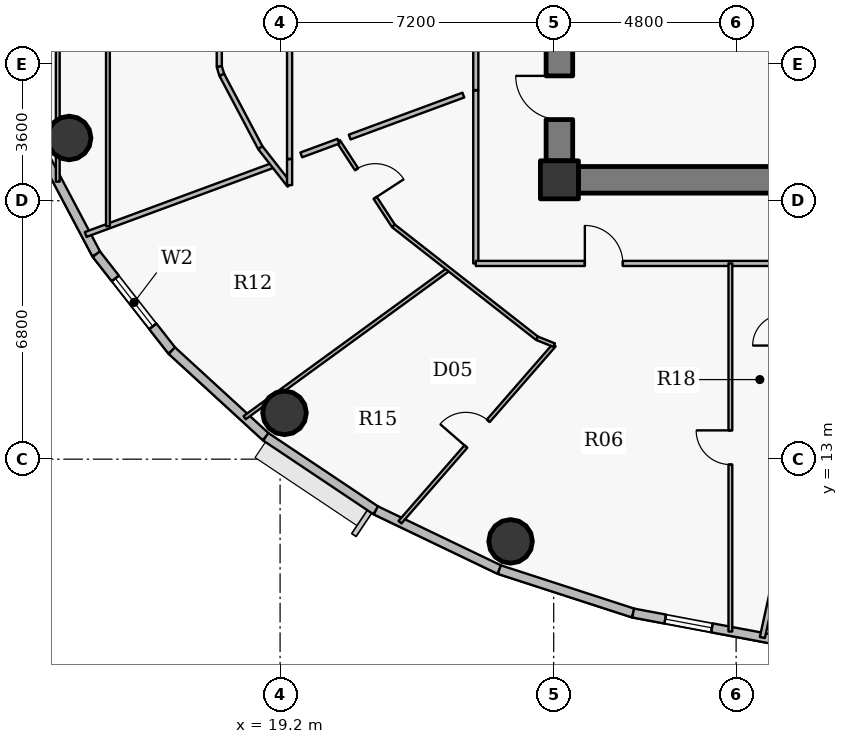
"""IFC4 building model, lengths in metres.
Left out: names, types, materials, properties, quantities, classifications, styles, units other than length and angle.
Written with IfcOpenShell. Run it as: python <this file> out.ifc"""

import sys

from ifc_helpers import new_model, si_unit, direction, frame, frame_2d, origin, origin_2d, place, context, subcontext, project, spatial, rectangle, hollow_circle, extrude, source, transform, mapped, element, fill, save


model = new_model("IFC4")
c1 = context("Model", 3, precision=1e-05, world=origin(), true_north=direction((0.0, 1.0)))
c2 = subcontext(c1, "Body", "Model", "MODEL_VIEW")
j1 = project(units=[si_unit("LENGTHUNIT", "METRE"), si_unit("PLANEANGLEUNIT", "RADIAN")], contexts=[c1])
p1 = place(None, origin())
s1 = spatial("IfcSite", under=j1, at=p1, CompositionType="ELEMENT")
p2 = place(p1, origin())
s2 = spatial("IfcBuilding", under=s1, at=p2, CompositionType="ELEMENT")
p3 = place(p2, frame((0.0, 0.0, 221.55)))
s3 = spatial("IfcBuildingStorey", under=s2, at=p3, CompositionType="ELEMENT", Elevation=221.55)
p4 = place(p3, frame((26.55, 20.35, 0.0), z_axis=(0.0, 0.0, 1.0), x_axis=(1.0, 0.0, 0.0)))
e1 = element("IfcColumn", 1, at=p4, inside=s3, PredefinedType="COLUMN", context=c2, shape_type="SweptSolid", body=[
    extrude(rectangle(XDim=1.0, YDim=1.0, at=origin_2d()), origin(), (0.0, 0.0, 1.0), 3.75),
])
p5 = place(p3, frame((44.95, 20.35, 0.0), z_axis=(0.0, 0.0, 1.0), x_axis=(-1.0, 0.0, 0.0)))
e2 = element("IfcWall", 2, at=p5, inside=s3, PredefinedType="SHEAR", context=c2, shape_type="SweptSolid", body=[
    extrude(rectangle(XDim=17.9, YDim=0.7, at=frame_2d((8.95, 0.0))), origin(), (0.0, 0.0, 1.0), 3.05),
])
p6 = place(p5, frame((9.7, 0.0, 0.0)))
e3 = element("IfcOpeningElement", 3, at=p6, cuts=e2, PredefinedType="OPENING", context=c2, shape_type="SweptSolid", body=[
    extrude(rectangle(XDim=1.15, YDim=2.15, at=origin_2d()), frame((0.575, 0.36, 1.075), z_axis=(0.0, -1.0, 0.0), x_axis=(1.0, 0.0, 0.0)), (0.0, 0.0, 1.0), 0.72),
])
p7 = place(p3, frame((26.55, 20.85, 0.0), z_axis=(0.0, 0.0, 1.0), x_axis=(0.0, 1.0, 0.0)))
e4 = element("IfcWall", 4, at=p7, inside=s3, PredefinedType="SHEAR", context=c2, shape_type="SweptSolid", body=[
    extrude(rectangle(XDim=12.3, YDim=0.7, at=frame_2d((6.15, 0.0))), origin(), (0.0, 0.0, 1.0), 3.05),
])
p8 = place(p7, frame((1.085, 0.0, 0.0)))
e5 = element("IfcOpeningElement", 5, at=p8, cuts=e4, PredefinedType="OPENING", context=c2, shape_type="SweptSolid", body=[
    extrude(rectangle(XDim=1.15, YDim=2.15, at=origin_2d()), frame((0.575, 0.36, 1.075), z_axis=(0.0, -1.0, 0.0), x_axis=(1.0, 0.0, 0.0)), (0.0, 0.0, 1.0), 0.72),
])
for number, where, z_axis, x_axis in (
    (6, (13.649, 21.451, 0.0), (0.0, 0.0, 1.0), (1.0, 0.0, 0.0)),
    (7, (19.317, 14.219, 0.0), (0.0, 0.0, 1.0), (1.0, 0.0, 0.0)),
    (8, (25.265, 10.836, 0.0), (0.0, 0.0, 1.0), (1.0, 0.0, 0.0)),
):
    element("IfcColumn", number, at=place(p3, frame(where, z_axis=z_axis, x_axis=x_axis)), inside=s3, PredefinedType="COLUMN", context=c2, shape_type="SweptSolid", body=[
        extrude(hollow_circle(Radius=0.575, WallThickness=0.036, at=origin_2d()), origin(), (0.0, 0.0, 1.0), 3.75),
    ])
p9 = place(p3, frame((14.364, 18.395, 0.0), z_axis=(0.0, 0.0, 1.0), x_axis=(-0.46766049993, 0.883908172157, 0.0)))
e9 = element("IfcWall", 9, at=p9, inside=s3, PredefinedType="SOLIDWALL", context=c2, shape_type="SweptSolid", body=[
    extrude(rectangle(XDim=3.11, YDim=0.24, at=frame_2d((1.555, 0.0))), origin(), (0.0, 0.0, 1.0), 3.5),
])
p10 = place(p3, frame((16.352, 15.855, 0.0), z_axis=(0.0, 0.0, 1.0), x_axis=(-0.616312344705, 0.787501805562, 0.0)))
e10 = element("IfcWall", 10, at=p10, inside=s3, PredefinedType="SOLIDWALL", context=c2, shape_type="SweptSolid", body=[
    extrude(rectangle(XDim=3.225, YDim=0.24, at=frame_2d((1.612, 0.0))), origin(), (0.0, 0.0, 1.0), 3.5),
])
p11 = place(p10, frame((0.812, 0.0, 0.9)))
e11 = element("IfcOpeningElement", 11, at=p11, cuts=e10, PredefinedType="OPENING", context=c2, shape_type="SweptSolid", body=[
    extrude(rectangle(XDim=1.6, YDim=1.75, at=origin_2d()), frame((0.8, 0.13, 0.875), z_axis=(0.0, -1.0, 0.0), x_axis=(1.0, 0.0, 0.0)), (0.0, 0.0, 1.0), 0.26),
])
p12 = place(p3, frame((18.824, 13.589, 0.0), z_axis=(0.0, 0.0, 1.0), x_axis=(-0.737123922599, 0.675757591694, 0.0)))
e12 = element("IfcWall", 12, at=p12, inside=s3, PredefinedType="SOLIDWALL", context=c2, shape_type="SweptSolid", body=[
    extrude(rectangle(XDim=3.354, YDim=0.24, at=frame_2d((1.677, 0.0))), origin(), (0.0, 0.0, 1.0), 3.5),
])
p13 = place(p3, frame((21.72, 11.652, 0.0), z_axis=(0.0, 0.0, 1.0), x_axis=(-0.831262496074, 0.555880079352, 0.0)))
e13 = element("IfcWall", 13, at=p13, inside=s3, PredefinedType="SOLIDWALL", context=c2, shape_type="SweptSolid", body=[
    extrude(rectangle(XDim=3.484, YDim=0.24, at=frame_2d((1.742, 0.0))), origin(), (0.0, 0.0, 1.0), 3.5),
])
p14 = place(p3, frame((24.969, 10.094, 0.0), z_axis=(0.0, 0.0, 1.0), x_axis=(-0.901598104751, 0.432574684313, 0.0)))
e14 = element("IfcWall", 14, at=p14, inside=s3, PredefinedType="SOLIDWALL", context=c2, shape_type="SweptSolid", body=[
    extrude(rectangle(XDim=3.604, YDim=0.24, at=frame_2d((1.802, 0.0))), origin(), (0.0, 0.0, 1.0), 3.5),
])
p15 = place(p3, frame((28.491, 8.951, 0.0), z_axis=(0.0, 0.0, 1.0), x_axis=(-0.951210789182, 0.308541787354, 0.0)))
e15 = element("IfcWall", 15, at=p15, inside=s3, PredefinedType="SOLIDWALL", context=c2, shape_type="SweptSolid", body=[
    extrude(rectangle(XDim=3.702, YDim=0.24, at=frame_2d((1.851, 0.0))), origin(), (0.0, 0.0, 1.0), 3.5),
])
p16 = place(p3, frame((32.198, 8.254, 0.0), z_axis=(0.0, 0.0, 1.0), x_axis=(-0.982784898575, 0.184753465822, 0.0)))
e16 = element("IfcWall", 16, at=p16, inside=s3, PredefinedType="SOLIDWALL", context=c2, shape_type="SweptSolid", body=[
    extrude(rectangle(XDim=3.773, YDim=0.24, at=frame_2d((1.886, 0.0))), origin(), (0.0, 0.0, 1.0), 3.5),
])
p17 = place(p16, frame((1.664, 0.0, 0.9)))
e17 = element("IfcOpeningElement", 17, at=p17, cuts=e16, PredefinedType="OPENING", context=c2, shape_type="SweptSolid", body=[
    extrude(rectangle(XDim=1.25, YDim=1.65, at=origin_2d()), frame((0.625, 0.13, 0.825), z_axis=(0.0, -1.0, 0.0), x_axis=(1.0, 0.0, 0.0)), (0.0, 0.0, 1.0), 0.26),
])
p18 = place(p3, frame((13.35, 20.301, 0.0), z_axis=(0.0, 0.0, 1.0), x_axis=(0.0, 1.0, 0.0)))
e18 = element("IfcWall", 18, at=p18, inside=s3, PredefinedType="PARTITIONING", context=c2, shape_type="SweptSolid", body=[
    extrude(rectangle(XDim=10.05, YDim=0.1, at=frame_2d((5.025, 0.0))), origin(), (0.0, 0.0, 1.0), 2.935),
])
p19 = place(p3, frame((14.085, 18.912, 0.0), z_axis=(0.0, 0.0, 1.0), x_axis=(0.938158194698, 0.346206877055, 0.0)))
e19 = element("IfcWall", 19, at=p19, inside=s3, PredefinedType="PARTITIONING", context=c2, shape_type="SweptSolid", body=[
    extrude(rectangle(XDim=5.278, YDim=0.135, at=frame_2d((2.639, 0.0))), origin(), (0.0, 0.0, 1.0), 2.985),
])
p20 = place(p3, frame((14.67, 19.128, 0.0), z_axis=(0.0, 0.0, 1.0), x_axis=(0.0, 1.0, 0.0)))
e20 = element("IfcWall", 20, at=p20, inside=s3, PredefinedType="PARTITIONING", context=c2, shape_type="SweptSolid", body=[
    extrude(rectangle(XDim=11.028, YDim=0.1, at=frame_2d((5.514, 0.0))), origin(), (0.0, 0.0, 1.0), 2.935),
])
p21 = place(p20, frame((5.064, 0.0, 0.0)))
e21 = element("IfcOpeningElement", 21, at=p21, cuts=e20, PredefinedType="OPENING", context=c2, shape_type="SweptSolid", body=[
    extrude(rectangle(XDim=0.9, YDim=2.1, at=origin_2d()), frame((0.45, 0.06, 1.05), z_axis=(0.0, -1.0, 0.0), x_axis=(1.0, 0.0, 0.0)), (0.0, 0.0, 1.0), 0.12),
])
p22 = place(p3, frame((17.6, 23.328, 0.0), z_axis=(0.0, 0.0, 1.0), x_axis=(0.0, 1.0, 0.0)))
e22 = element("IfcWall", 22, at=p22, inside=s3, PredefinedType="PARTITIONING", context=c2, shape_type="SweptSolid", body=[
    extrude(rectangle(XDim=4.622, YDim=0.135, at=frame_2d((2.311, 0.0))), origin(), (0.0, 0.0, 1.0), 2.935),
])
p23 = place(p3, frame((17.6, 23.328, 0.0), z_axis=(0.0, 0.0, 1.0), x_axis=(0.292875000845, -0.956150738053, 0.0)))
e23 = element("IfcWall", 23, at=p23, inside=s3, PredefinedType="PARTITIONING", context=c2, shape_type="SweptSolid", body=[
    extrude(rectangle(XDim=0.227, YDim=0.135, at=frame_2d((0.113, 0.0))), origin(), (0.0, 0.0, 1.0), 3.5),
])
p24 = place(p3, frame((17.667, 23.111, 0.0), z_axis=(0.0, 0.0, 1.0), x_axis=(0.467675622269, -0.883900171024, 0.0)))
e24 = element("IfcWall", 24, at=p24, inside=s3, PredefinedType="PARTITIONING", context=c2, shape_type="SweptSolid", body=[
    extrude(rectangle(XDim=2.168, YDim=0.135, at=frame_2d((1.084, 0.0))), origin(), (0.0, 0.0, 1.0), 2.935),
])
p25 = place(p3, frame((18.268, 14.092, 0.0), z_axis=(0.0, 0.0, 1.0), x_axis=(0.808481640117, 0.588521399436, 0.0)))
e25 = element("IfcWall", 25, at=p25, inside=s3, PredefinedType="PARTITIONING", context=c2, shape_type="SweptSolid", body=[
    extrude(rectangle(XDim=6.641, YDim=0.1, at=frame_2d((3.32, 0.0))), origin(), (0.0, 0.0, 1.0), 2.985),
])
p26 = place(p3, frame((18.681, 21.194, 0.0), z_axis=(0.0, 0.0, 1.0), x_axis=(0.616239706802, -0.787558647823, 0.0)))
e26 = element("IfcWall", 26, at=p26, inside=s3, PredefinedType="PARTITIONING", context=c2, shape_type="SweptSolid", body=[
    extrude(rectangle(XDim=1.248, YDim=0.135, at=frame_2d((0.624, 0.0))), origin(), (0.0, 0.0, 1.0), 3.5),
])
p27 = place(p3, frame((19.45, 20.211, 0.0), z_axis=(0.0, 0.0, 1.0), x_axis=(0.0, 1.0, 0.0)))
e27 = element("IfcWall", 27, at=p27, inside=s3, PredefinedType="PARTITIONING", context=c2, shape_type="SweptSolid", body=[
    extrude(rectangle(XDim=0.681, YDim=0.135, at=frame_2d((0.34, 0.0))), origin(), (0.0, 0.0, 1.0), 3.5),
])
p28 = place(p3, frame((20.733, 21.366, 0.0), z_axis=(0.0, 0.0, 1.0), x_axis=(0.545375949152, -0.838191549758, 0.0)))
e28 = element("IfcWall", 28, at=p28, inside=s3, PredefinedType="PARTITIONING", context=c2, shape_type="SweptSolid", body=[
    extrude(rectangle(XDim=2.656, YDim=0.1, at=frame_2d((1.328, 0.0))), origin(), (0.0, 0.0, 1.0), 3.5),
])
p29 = place(p28, frame((0.878, 0.0, 0.0)))
e29 = element("IfcOpeningElement", 29, at=p29, cuts=e28, PredefinedType="OPENING", context=c2, shape_type="SweptSolid", body=[
    extrude(rectangle(XDim=0.9, YDim=2.1, at=origin_2d()), frame((0.45, 0.06, 1.05), z_axis=(0.0, -1.0, 0.0), x_axis=(1.0, 0.0, 0.0)), (0.0, 0.0, 1.0), 0.12),
])
p30 = place(p3, frame((22.182, 19.139, 0.0), z_axis=(0.0, 0.0, 1.0), x_axis=(0.787386902975, -0.616459134917, 0.0)))
e30 = element("IfcWall", 30, at=p30, inside=s3, PredefinedType="PARTITIONING", context=c2, shape_type="SweptSolid", body=[
    extrude(rectangle(XDim=4.799, YDim=0.1, at=frame_2d((2.399, 0.0))), origin(), (0.0, 0.0, 1.0), 2.935),
])
p31 = place(p3, frame((22.355, 11.342, 0.0), z_axis=(0.0, 0.0, 1.0), x_axis=(0.657017747133, 0.753875108989, 0.0)))
e31 = element("IfcWall", 31, at=p31, inside=s3, PredefinedType="PARTITIONING", context=c2, shape_type="SweptSolid", body=[
    extrude(rectangle(XDim=6.178, YDim=0.1, at=frame_2d((3.089, 0.0))), origin(), (0.0, 0.0, 1.0), 2.985),
])
p32 = place(p31, frame((2.639, 0.0, 0.0)))
e32 = element("IfcOpeningElement", 32, at=p32, cuts=e31, PredefinedType="OPENING", context=c2, shape_type="SweptSolid", body=[
    extrude(rectangle(XDim=0.9, YDim=2.1, at=origin_2d()), frame((0.45, 0.06, 1.05), z_axis=(0.0, -1.0, 0.0), x_axis=(1.0, 0.0, 0.0)), (0.0, 0.0, 1.0), 0.12),
])
p33 = place(p3, frame((24.35, 18.15, 0.0), z_axis=(0.0, 0.0, 1.0), x_axis=(0.0, 1.0, 0.0)))
e33 = element("IfcWall", 33, at=p33, inside=s3, PredefinedType="PARTITIONING", context=c2, shape_type="SweptSolid", body=[
    extrude(rectangle(XDim=4.551, YDim=0.135, at=frame_2d((2.275, 0.0))), origin(), (0.0, 0.0, 1.0), 2.935),
])
p34 = place(p3, frame((24.35, 18.15, 0.0), z_axis=(0.0, 0.0, 1.0), x_axis=(1.0, 0.0, 0.0)))
e34 = element("IfcWall", 34, at=p34, inside=s3, PredefinedType="PARTITIONING", context=c2, shape_type="SweptSolid", body=[
    extrude(rectangle(XDim=23.85, YDim=0.135, at=frame_2d((11.925, 0.0))), origin(), (0.0, 0.0, 1.0), 2.935),
])
p35 = place(p34, frame((2.87, 0.0, 0.0)))
e35 = element("IfcOpeningElement", 35, at=p35, cuts=e34, PredefinedType="OPENING", context=c2, shape_type="SweptSolid", body=[
    extrude(rectangle(XDim=1.0, YDim=2.15, at=origin_2d()), frame((0.5, 0.078, 1.075), z_axis=(0.0, -1.0, 0.0), x_axis=(1.0, 0.0, 0.0)), (0.0, 0.0, 1.0), 0.155),
])
p36 = place(p34, frame((16.13, 0.0, 0.0)))
e36 = element("IfcOpeningElement", 36, at=p36, cuts=e34, PredefinedType="OPENING", context=c2, shape_type="SweptSolid", body=[
    extrude(rectangle(XDim=1.0, YDim=2.15, at=origin_2d()), frame((0.5, 0.078, 1.075), z_axis=(0.0, -1.0, 0.0), x_axis=(1.0, 0.0, 0.0)), (0.0, 0.0, 1.0), 0.155),
])
p37 = place(p3, frame((25.961, 16.181, 0.0), z_axis=(0.0, 0.0, 1.0), x_axis=(0.928718060564, -0.370786682585, 0.0)))
e37 = element("IfcWall", 37, at=p37, inside=s3, PredefinedType="PARTITIONING", context=c2, shape_type="SweptSolid", body=[
    extrude(rectangle(XDim=0.488, YDim=0.1, at=frame_2d((0.244, 0.0))), origin(), (0.0, 0.0, 1.0), 3.5),
])
p38 = place(p3, frame((31.049, 8.465, 0.0), z_axis=(0.0, 0.0, 1.0), x_axis=(0.0, 1.0, 0.0)))
e38 = element("IfcWall", 38, at=p38, inside=s3, PredefinedType="PARTITIONING", context=c2, shape_type="SweptSolid", body=[
    extrude(rectangle(XDim=9.685, YDim=0.1, at=frame_2d((4.842, 0.0))), origin(), (0.0, 0.0, 1.0), 2.985),
])
p39 = place(p38, frame((4.392, 0.0, 0.0)))
e39 = element("IfcOpeningElement", 39, at=p39, cuts=e38, PredefinedType="OPENING", context=c2, shape_type="SweptSolid", body=[
    extrude(rectangle(XDim=0.9, YDim=2.1, at=origin_2d()), frame((0.45, 0.06, 1.05), z_axis=(0.0, -1.0, 0.0), x_axis=(1.0, 0.0, 0.0)), (0.0, 0.0, 1.0), 0.12),
])
p40 = place(p3, frame((31.891, 8.307, 0.0), z_axis=(0.0, 0.0, 1.0), x_axis=(0.214700779338, 0.976679873526, 0.0)))
e40 = element("IfcWall", 40, at=p40, inside=s3, PredefinedType="PARTITIONING", context=c2, shape_type="SweptSolid", body=[
    extrude(rectangle(XDim=2.632, YDim=0.135, at=frame_2d((1.316, 0.0))), origin(), (0.0, 0.0, 1.0), 2.985),
])
p41 = place(p3, frame((19.45, 26.05, 0.0), z_axis=(0.0, 0.0, 1.0), x_axis=(0.0, -1.0, 0.0)))
e41 = element("IfcWall", 41, at=p41, inside=s3, PredefinedType="PARTITIONING", context=c2, shape_type="SweptSolid", body=[
    extrude(rectangle(XDim=5.148, YDim=0.135, at=frame_2d((2.574, 0.0))), origin(), (0.0, 0.0, 1.0), 2.935),
])
p42 = place(p3, frame((26.2, 20.84, 0.0), z_axis=(0.0, 0.0, 1.0), x_axis=(0.0, -1.0, 0.0)))
e42 = element("IfcWall", 42, at=p42, inside=s3, PredefinedType="PARTITIONING", context=c2, shape_type="SweptSolid", body=[
    extrude(rectangle(XDim=0.84, YDim=0.135, at=frame_2d((0.42, 0.0))), origin(), (0.0, 0.0, 1.0), 3.5),
])
p43 = place(p3, frame((26.508, 20.0, 0.0), z_axis=(0.0, 0.0, 1.0), x_axis=(1.0, 0.0, 0.0)))
e43 = element("IfcWall", 43, at=p43, inside=s3, PredefinedType="PARTITIONING", context=c2, shape_type="SweptSolid", body=[
    extrude(rectangle(XDim=0.532, YDim=0.135, at=frame_2d((0.266, 0.0))), origin(), (0.0, 0.0, 1.0), 2.935),
])
p44 = place(p3, frame((24.35, 22.71, 0.0), z_axis=(0.0, 0.0, 1.0), x_axis=(0.0, 1.0, 0.0)))
e44 = element("IfcWall", 44, at=p44, inside=s3, PredefinedType="PARTITIONING", context=c2, shape_type="SweptSolid", body=[
    extrude(rectangle(XDim=3.34, YDim=0.135, at=frame_2d((1.67, 0.0))), origin(), (0.0, 0.0, 1.0), 2.935),
])
p45 = place(p3, frame((21.031, 21.476, 0.0), z_axis=(0.0, 0.0, 1.0), x_axis=(0.938166504217, 0.346184358926, 0.0)))
e45 = element("IfcWall", 45, at=p45, inside=s3, PredefinedType="PARTITIONING", context=c2, shape_type="SweptSolid", body=[
    extrude(rectangle(XDim=3.188, YDim=0.135, at=frame_2d((1.594, 0.0))), origin(), (0.0, 0.0, 1.0), 3.5),
])
p46 = place(p3, frame((19.758, 21.006, 0.0), z_axis=(0.0, 0.0, 1.0), x_axis=(0.938130503792, 0.346281905179, 0.0)))
e46 = element("IfcWall", 46, at=p46, inside=s3, PredefinedType="PARTITIONING", context=c2, shape_type="SweptSolid", body=[
    extrude(rectangle(XDim=1.04, YDim=0.135, at=frame_2d((0.52, 0.0))), origin(), (0.0, 0.0, 1.0), 3.5),
])
m1 = source(origin(), c2, "Body", "SweptSolid", [
    extrude(rectangle(XDim=1.6, YDim=1.75, at=origin_2d()), frame((0.8, 0.03, 0.875), z_axis=(0.0, -1.0, 0.0), x_axis=(1.0, 0.0, 0.0)), (0.0, 0.0, 1.0), 0.06),
])
p47 = place(p11, origin())
e47 = element("IfcWindow", 47, at=p47, inside=s3, PartitioningType="DOUBLE_PANEL_VERTICAL", PredefinedType="WINDOW", context=c2, shape_type="MappedRepresentation", body=[
    mapped(m1, transform((0.0, 0.0, 0.0), x_axis=(1.0, 0.0, 0.0), y_axis=(0.0, 1.0, 0.0), z_axis=(0.0, 0.0, 1.0), scale=1.0)),
])
fill(e11, e47)
m2 = source(origin(), c2, "Body", "SweptSolid", [
    extrude(rectangle(XDim=1.25, YDim=1.65, at=origin_2d()), frame((0.625, 0.03, 0.825), z_axis=(0.0, -1.0, 0.0), x_axis=(1.0, 0.0, 0.0)), (0.0, 0.0, 1.0), 0.06),
])
p48 = place(p17, origin())
e48 = element("IfcWindow", 48, at=p48, inside=s3, PartitioningType="SINGLE_PANEL", PredefinedType="WINDOW", context=c2, shape_type="MappedRepresentation", body=[
    mapped(m2, transform((0.0, 0.0, 0.0), x_axis=(1.0, 0.0, 0.0), y_axis=(0.0, 1.0, 0.0), z_axis=(0.0, 0.0, 1.0), scale=1.0)),
])
fill(e17, e48)
m3 = source(origin(), c2, "Body", "SweptSolid", [
    extrude(rectangle(XDim=1.15, YDim=2.15, at=origin_2d()), frame((0.575, 0.025, 1.075), z_axis=(0.0, -1.0, 0.0), x_axis=(1.0, 0.0, 0.0)), (0.0, 0.0, 1.0), 0.05),
])
p49 = place(p8, origin())
e49 = element("IfcDoor", 49, at=p49, inside=s3, OperationType="SINGLE_SWING_RIGHT", PredefinedType="DOOR", context=c2, shape_type="MappedRepresentation", body=[
    mapped(m3, transform((0.0, 0.0, 0.0), x_axis=(1.0, 0.0, 0.0), y_axis=(0.0, 1.0, 0.0), z_axis=(0.0, 0.0, 1.0), scale=1.0)),
])
fill(e5, e49)
m4 = source(origin(), c2, "Body", "SweptSolid", [
    extrude(rectangle(XDim=1.0, YDim=2.15, at=origin_2d()), frame((0.5, 0.025, 1.075), z_axis=(0.0, -1.0, 0.0), x_axis=(1.0, 0.0, 0.0)), (0.0, 0.0, 1.0), 0.05),
])
p50 = place(p35, origin())
e50 = element("IfcDoor", 50, at=p50, inside=s3, OperationType="SINGLE_SWING_LEFT", PredefinedType="DOOR", context=c2, shape_type="MappedRepresentation", body=[
    mapped(m4, transform((0.0, 0.0, 0.0), x_axis=(1.0, 0.0, 0.0), y_axis=(0.0, 1.0, 0.0), z_axis=(0.0, 0.0, 1.0), scale=1.0)),
])
fill(e35, e50)
m5 = source(origin(), c2, "Body", "SweptSolid", [
    extrude(rectangle(XDim=0.9, YDim=2.1, at=origin_2d()), frame((0.45, 0.025, 1.05), z_axis=(0.0, -1.0, 0.0), x_axis=(1.0, 0.0, 0.0)), (0.0, 0.0, 1.0), 0.05),
])
p51 = place(p29, origin())
e51 = element("IfcDoor", 51, at=p51, inside=s3, OperationType="SINGLE_SWING_RIGHT", PredefinedType="DOOR", context=c2, shape_type="MappedRepresentation", body=[
    mapped(m5, transform((0.0, 0.0, 0.0), x_axis=(1.0, 0.0, 0.0), y_axis=(0.0, 1.0, 0.0), z_axis=(0.0, 0.0, 1.0), scale=1.0)),
])
fill(e29, e51)
p52 = place(p32, origin())
e52 = element("IfcDoor", 52, at=p52, inside=s3, OperationType="SINGLE_SWING_LEFT", PredefinedType="DOOR", context=c2, shape_type="MappedRepresentation", body=[
    mapped(m5, transform((0.0, 0.0, 0.0), x_axis=(1.0, 0.0, 0.0), y_axis=(0.0, 1.0, 0.0), z_axis=(0.0, 0.0, 1.0), scale=1.0)),
])
fill(e32, e52)
p53 = place(p39, origin())
e53 = element("IfcDoor", 53, at=p53, inside=s3, OperationType="SINGLE_SWING_RIGHT", PredefinedType="DOOR", context=c2, shape_type="MappedRepresentation", body=[
    mapped(m5, transform((0.0, 0.0, 0.0), x_axis=(1.0, 0.0, 0.0), y_axis=(0.0, 1.0, 0.0), z_axis=(0.0, 0.0, 1.0), scale=1.0)),
])
fill(e39, e53)
save(model, sys.argv[1])
